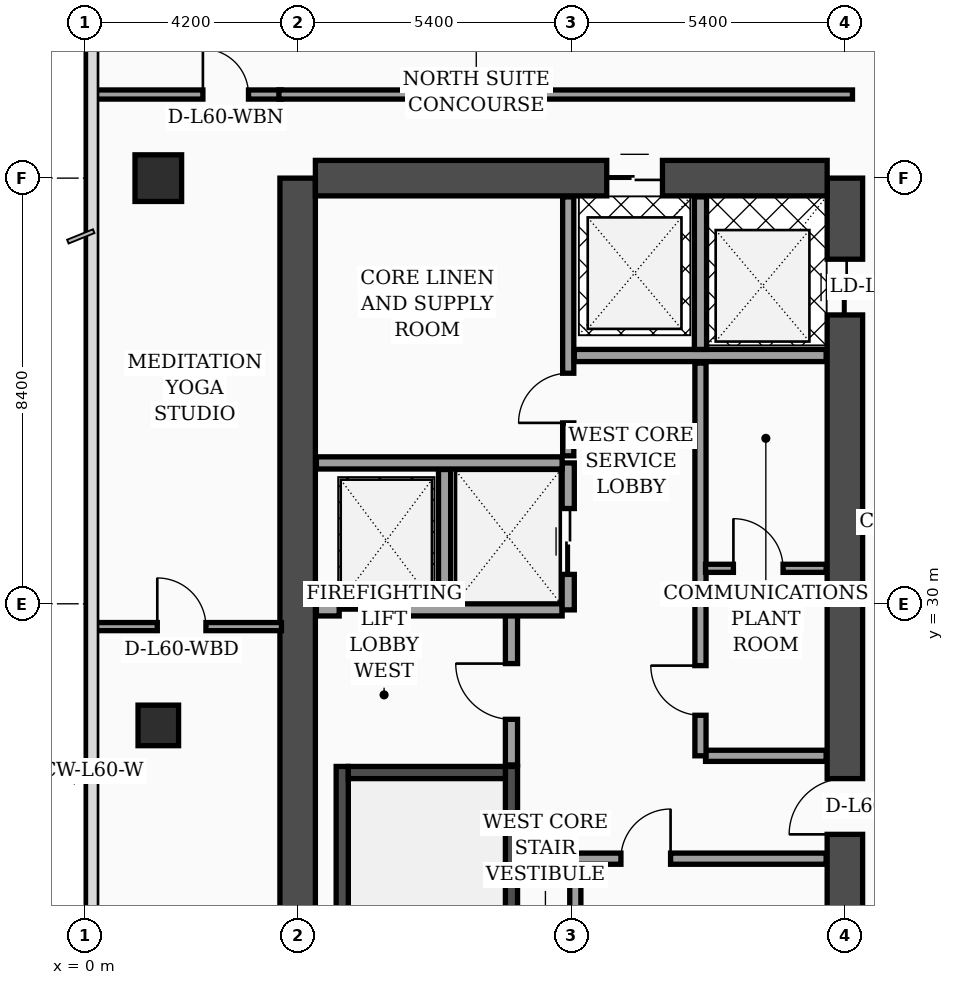
"""IFC4 building model, lengths in metres.
Left out: names, types, materials, properties, quantities, classifications, styles, units other than length and angle.
Written with IfcOpenShell. Run it as: python <this file> out.ifc"""

import sys

from ifc_helpers import new_model, si_unit, direction, frame, frame_2d, origin, origin_2d, place, context, subcontext, project, spatial, rectangle, extrude, element, fill, save


model = new_model("IFC4")
c1 = context("Model", 3, precision=1e-05, world=origin(), true_north=direction((0.0, 1.0)))
c2 = subcontext(c1, "Body", "Model", "MODEL_VIEW")
j1 = project(units=[si_unit("LENGTHUNIT", "METRE"), si_unit("PLANEANGLEUNIT", "RADIAN")], contexts=[c1])
p1 = place(None, origin())
s1 = spatial("IfcSite", under=j1, at=p1, CompositionType="ELEMENT")
p2 = place(p1, origin())
s2 = spatial("IfcBuilding", under=s1, at=p2, CompositionType="ELEMENT")
p3 = place(p2, frame((0.0, 0.0, 243.8)))
s3 = spatial("IfcBuildingStorey", under=s2, at=p3, CompositionType="ELEMENT", Elevation=243.8)
p4 = place(p3, frame((4.2, 16.8, 0.0), z_axis=(0.0, 0.0, 1.0), x_axis=(0.0, 1.0, 0.0)))
e1 = element("IfcWall", 1, at=p4, inside=s3, PredefinedType="SHEAR", context=c2, shape_type="SweptSolid", body=[
    extrude(rectangle(XDim=21.6, YDim=0.7, at=frame_2d((10.8, 0.0))), origin(), (0.0, 0.0, 1.0), 3.56),
])
p5 = place(p3, frame((15.0, 16.8, 0.0), z_axis=(0.0, 0.0, 1.0), x_axis=(0.0, 1.0, 0.0)))
e2 = element("IfcWall", 2, at=p5, inside=s3, PredefinedType="SHEAR", context=c2, shape_type="SweptSolid", body=[
    extrude(rectangle(XDim=21.6, YDim=0.7, at=frame_2d((10.8, 0.0))), origin(), (0.0, 0.0, 1.0), 3.56),
])
p6 = place(p5, frame((8.65, 0.0, 0.0)))
e3 = element("IfcOpeningElement", 3, at=p6, cuts=e2, PredefinedType="OPENING", context=c2, shape_type="SweptSolid", body=[
    extrude(rectangle(XDim=1.1, YDim=2.2, at=frame_2d((0.55, 1.1))), frame((0.0, 0.36, 0.0), z_axis=(0.0, -1.0, 0.0), x_axis=(1.0, 0.0, 0.0)), (0.0, 0.0, 1.0), 0.72),
])
p7 = place(p5, frame((18.9, 0.0, 0.0)))
e4 = element("IfcOpeningElement", 4, at=p7, cuts=e2, PredefinedType="OPENING", context=c2, shape_type="SweptSolid", body=[
    extrude(rectangle(XDim=1.1, YDim=2.2, at=frame_2d((0.55, 1.1))), frame((0.0, 0.36, 0.0), z_axis=(0.0, -1.0, 0.0), x_axis=(1.0, 0.0, 0.0)), (0.0, 0.0, 1.0), 0.72),
])
p8 = place(p3, frame((4.55, 38.4, 0.0), z_axis=(0.0, 0.0, 1.0), x_axis=(1.0, 0.0, 0.0)))
e5 = element("IfcWall", 5, at=p8, inside=s3, PredefinedType="SHEAR", context=c2, shape_type="SweptSolid", body=[
    extrude(rectangle(XDim=10.1, YDim=0.7, at=frame_2d((5.05, 0.0))), origin(), (0.0, 0.0, 1.0), 3.56),
])
p9 = place(p8, frame((5.75, 0.0, 0.0)))
e6 = element("IfcOpeningElement", 6, at=p9, cuts=e5, PredefinedType="OPENING", context=c2, shape_type="SweptSolid", body=[
    extrude(rectangle(XDim=1.1, YDim=2.2, at=frame_2d((0.55, 1.1))), frame((0.0, 0.36, 0.0), z_axis=(0.0, -1.0, 0.0), x_axis=(1.0, 0.0, 0.0)), (0.0, 0.0, 1.0), 0.72),
])
p10 = place(p3, frame((5.08, 17.15, 0.0), z_axis=(0.0, 0.0, 1.0), x_axis=(0.0, 1.0, 0.0)))
e7 = element("IfcWall", 7, at=p10, inside=s3, PredefinedType="SOLIDWALL", context=c2, shape_type="SweptSolid", body=[
    extrude(rectangle(XDim=9.64, YDim=0.24, at=frame_2d((4.82, 0.0))), origin(), (0.0, 0.0, 1.0), 3.56),
])
p11 = place(p3, frame((8.42, 17.15, 0.0), z_axis=(0.0, 0.0, 1.0), x_axis=(0.0, 1.0, 0.0)))
e8 = element("IfcWall", 8, at=p11, inside=s3, PredefinedType="SOLIDWALL", context=c2, shape_type="SweptSolid", body=[
    extrude(rectangle(XDim=9.64, YDim=0.24, at=frame_2d((4.82, 0.0))), origin(), (0.0, 0.0, 1.0), 3.56),
])
p12 = place(p11, frame((0.35, 0.0, 0.0)))
e9 = element("IfcOpeningElement", 9, at=p12, cuts=e8, PredefinedType="OPENING", context=c2, shape_type="SweptSolid", body=[
    extrude(rectangle(XDim=1.15, YDim=2.2, at=frame_2d((0.575, 1.1))), frame((0.0, 0.13, 0.0), z_axis=(0.0, -1.0, 0.0), x_axis=(1.0, 0.0, 0.0)), (0.0, 0.0, 1.0), 0.26),
])
p13 = place(p3, frame((5.2, 26.67, 0.0), z_axis=(0.0, 0.0, 1.0), x_axis=(1.0, 0.0, 0.0)))
e10 = element("IfcWall", 10, at=p13, inside=s3, PredefinedType="SOLIDWALL", context=c2, shape_type="SweptSolid", body=[
    extrude(rectangle(XDim=3.1, YDim=0.24, at=frame_2d((1.55, 0.0))), origin(), (0.0, 0.0, 1.0), 3.56),
])
p14 = place(p3, frame((1.45, 27.6, 0.0), z_axis=(0.0, 0.0, 1.0), x_axis=(1.0, 0.0, 0.0)))
e11 = element("IfcColumn", 11, at=p14, inside=s3, PredefinedType="COLUMN", context=c2, shape_type="SweptSolid", body=[
    extrude(rectangle(XDim=0.8, YDim=0.8, at=origin_2d()), origin(), (0.0, 0.0, 1.0), 3.56),
])
p15 = place(p3, frame((1.45, 38.4, 0.0), z_axis=(0.0, 0.0, 1.0), x_axis=(1.0, 0.0, 0.0)))
e12 = element("IfcColumn", 12, at=p15, inside=s3, PredefinedType="COLUMN", context=c2, shape_type="SweptSolid", body=[
    extrude(rectangle(XDim=0.92, YDim=0.92, at=origin_2d()), origin(), (0.0, 0.0, 1.0), 3.56),
])
p16 = place(p3, frame((8.42, 26.82, 0.0), z_axis=(0.0, 0.0, 1.0), x_axis=(0.0, 1.0, 0.0)))
e13 = element("IfcWall", 13, at=p16, inside=s3, PredefinedType="SOLIDWALL", context=c2, shape_type="SweptSolid", body=[
    extrude(rectangle(XDim=3.0, YDim=0.24, at=frame_2d((1.5, 0.0))), origin(), (0.0, 0.0, 1.0), 3.56),
])
p17 = place(p16, frame((0.9, 0.0, 0.0)))
e14 = element("IfcOpeningElement", 14, at=p17, cuts=e13, PredefinedType="OPENING", context=c2, shape_type="SweptSolid", body=[
    extrude(rectangle(XDim=1.1, YDim=2.2, at=frame_2d((0.55, 1.1))), frame((0.0, 0.13, 0.0), z_axis=(0.0, -1.0, 0.0), x_axis=(1.0, 0.0, 0.0)), (0.0, 0.0, 1.0), 0.26),
])
p18 = place(p3, frame((4.57, 29.88, 0.0), z_axis=(0.0, 0.0, 1.0), x_axis=(1.0, 0.0, 0.0)))
e15 = element("IfcWall", 15, at=p18, inside=s3, PredefinedType="SOLIDWALL", context=c2, shape_type="SweptSolid", body=[
    extrude(rectangle(XDim=4.85, YDim=0.24, at=frame_2d((2.425, 0.0))), origin(), (0.0, 0.0, 1.0), 3.56),
])
p19 = place(p18, frame((0.45, 0.0, 0.0)))
e16 = element("IfcOpeningElement", 16, at=p19, cuts=e15, PredefinedType="OPENING", context=c2, shape_type="SweptSolid", body=[
    extrude(rectangle(XDim=1.3, YDim=2.35, at=frame_2d((0.65, 1.175))), frame((0.0, 0.13, 0.0), z_axis=(0.0, -1.0, 0.0), x_axis=(1.0, 0.0, 0.0)), (0.0, 0.0, 1.0), 0.26),
])
p20 = place(p3, frame((7.1, 30.02, 0.0), z_axis=(0.0, 0.0, 1.0), x_axis=(0.0, 1.0, 0.0)))
e17 = element("IfcWall", 17, at=p20, inside=s3, PredefinedType="SOLIDWALL", context=c2, shape_type="SweptSolid", body=[
    extrude(rectangle(XDim=2.63, YDim=0.24, at=frame_2d((1.315, 0.0))), origin(), (0.0, 0.0, 1.0), 3.56),
])
p21 = place(p3, frame((9.54, 29.88, 0.0), z_axis=(0.0, 0.0, 1.0), x_axis=(0.0, 1.0, 0.0)))
e18 = element("IfcWall", 18, at=p21, inside=s3, PredefinedType="SOLIDWALL", context=c2, shape_type="SweptSolid", body=[
    extrude(rectangle(XDim=2.9, YDim=0.24, at=frame_2d((1.45, 0.0))), origin(), (0.0, 0.0, 1.0), 3.56),
])
p22 = place(p21, frame((0.7, 0.0, 0.0)))
e19 = element("IfcOpeningElement", 19, at=p22, cuts=e18, PredefinedType="OPENING", context=c2, shape_type="SweptSolid", body=[
    extrude(rectangle(XDim=1.3, YDim=2.35, at=frame_2d((0.65, 1.175))), frame((0.0, 0.13, 0.0), z_axis=(0.0, -1.0, 0.0), x_axis=(1.0, 0.0, 0.0)), (0.0, 0.0, 1.0), 0.26),
])
p23 = place(p3, frame((4.57, 32.78, 0.0), z_axis=(0.0, 0.0, 1.0), x_axis=(1.0, 0.0, 0.0)))
e20 = element("IfcWall", 20, at=p23, inside=s3, PredefinedType="SOLIDWALL", context=c2, shape_type="SweptSolid", body=[
    extrude(rectangle(XDim=4.85, YDim=0.24, at=frame_2d((2.425, 0.0))), origin(), (0.0, 0.0, 1.0), 3.19),
])
p24 = place(p3, frame((9.68, 17.17, 0.0), z_axis=(0.0, 0.0, 1.0), x_axis=(0.0, 1.0, 0.0)))
e21 = element("IfcWall", 21, at=p24, inside=s3, PredefinedType="SOLIDWALL", context=c2, shape_type="SweptSolid", body=[
    extrude(rectangle(XDim=7.83, YDim=0.22, at=frame_2d((3.915, 0.0))), origin(), (0.0, 0.0, 1.0), 3.56),
])
p25 = place(p3, frame((9.54, 32.92, 0.0), z_axis=(0.0, 0.0, 1.0), x_axis=(0.0, 1.0, 0.0)))
e22 = element("IfcWall", 22, at=p25, inside=s3, PredefinedType="SOLIDWALL", context=c2, shape_type="SweptSolid", body=[
    extrude(rectangle(XDim=5.11, YDim=0.22, at=frame_2d((2.555, 0.0))), origin(), (0.0, 0.0, 1.0), 3.56),
])
p26 = place(p25, frame((0.65, 0.0, 0.0)))
e23 = element("IfcOpeningElement", 23, at=p26, cuts=e22, PredefinedType="OPENING", context=c2, shape_type="SweptSolid", body=[
    extrude(rectangle(XDim=0.98, YDim=2.15, at=frame_2d((0.49, 1.075))), frame((0.0, 0.12, 0.0), z_axis=(0.0, -1.0, 0.0), x_axis=(1.0, 0.0, 0.0)), (0.0, 0.0, 1.0), 0.24),
])
p27 = place(p3, frame((9.68, 24.97, 0.0), z_axis=(0.0, 0.0, 1.0), x_axis=(1.0, 0.0, 0.0)))
e24 = element("IfcWall", 24, at=p27, inside=s3, PredefinedType="SOLIDWALL", context=c2, shape_type="SweptSolid", body=[
    extrude(rectangle(XDim=4.95, YDim=0.22, at=frame_2d((2.475, 0.0))), origin(), (0.0, 0.0, 1.0), 2.99),
])
p28 = place(p27, frame((0.9, 0.0, 0.0)))
e25 = element("IfcOpeningElement", 25, at=p28, cuts=e24, PredefinedType="OPENING", context=c2, shape_type="SweptSolid", body=[
    extrude(rectangle(XDim=0.98, YDim=2.15, at=frame_2d((0.49, 1.075))), frame((0.0, 0.12, 0.0), z_axis=(0.0, -1.0, 0.0), x_axis=(1.0, 0.0, 0.0)), (0.0, 0.0, 1.0), 0.24),
])
p29 = place(p3, frame((12.25, 27.0, 0.0), z_axis=(0.0, 0.0, 1.0), x_axis=(1.0, 0.0, 0.0)))
e26 = element("IfcWall", 26, at=p29, inside=s3, PredefinedType="SOLIDWALL", context=c2, shape_type="SweptSolid", body=[
    extrude(rectangle(XDim=2.38, YDim=0.22, at=frame_2d((1.19, 0.0))), origin(), (0.0, 0.0, 1.0), 3.56),
])
p30 = place(p3, frame((12.15, 27.0, 0.0), z_axis=(0.0, 0.0, 1.0), x_axis=(0.0, 1.0, 0.0)))
e27 = element("IfcWall", 27, at=p30, inside=s3, PredefinedType="SOLIDWALL", context=c2, shape_type="SweptSolid", body=[
    extrude(rectangle(XDim=7.75, YDim=0.22, at=frame_2d((3.875, 0.0))), origin(), (0.0, 0.0, 1.0), 3.56),
])
p31 = place(p30, frame((0.8, 0.0, 0.0)))
e28 = element("IfcOpeningElement", 28, at=p31, cuts=e27, PredefinedType="OPENING", context=c2, shape_type="SweptSolid", body=[
    extrude(rectangle(XDim=0.98, YDim=2.15, at=frame_2d((0.49, 1.075))), frame((0.0, 0.12, 0.0), z_axis=(0.0, -1.0, 0.0), x_axis=(1.0, 0.0, 0.0)), (0.0, 0.0, 1.0), 0.24),
])
p32 = place(p3, frame((12.25, 30.7, 0.0), z_axis=(0.0, 0.0, 1.0), x_axis=(1.0, 0.0, 0.0)))
e29 = element("IfcWall", 29, at=p32, inside=s3, PredefinedType="PARTITIONING", context=c2, shape_type="SweptSolid", body=[
    extrude(rectangle(XDim=2.38, YDim=0.16, at=frame_2d((1.19, 0.0))), origin(), (0.0, 0.0, 1.0), 3.56),
])
p33 = place(p32, frame((0.55, 0.0, 0.0)))
e30 = element("IfcOpeningElement", 30, at=p33, cuts=e29, PredefinedType="OPENING", context=c2, shape_type="SweptSolid", body=[
    extrude(rectangle(XDim=0.98, YDim=2.15, at=frame_2d((0.49, 1.075))), frame((0.0, 0.09, 0.0), z_axis=(0.0, -1.0, 0.0), x_axis=(1.0, 0.0, 0.0)), (0.0, 0.0, 1.0), 0.18),
])
p34 = place(p3, frame((9.66, 34.9, 0.0), z_axis=(0.0, 0.0, 1.0), x_axis=(1.0, 0.0, 0.0)))
e31 = element("IfcWall", 31, at=p34, inside=s3, PredefinedType="SOLIDWALL", context=c2, shape_type="SweptSolid", body=[
    extrude(rectangle(XDim=4.97, YDim=0.24, at=frame_2d((2.485, 0.0))), origin(), (0.0, 0.0, 1.0), 3.56),
])
p35 = place(p3, frame((12.15, 35.02, 0.0), z_axis=(0.0, 0.0, 1.0), x_axis=(0.0, 1.0, 0.0)))
e32 = element("IfcWall", 32, at=p35, inside=s3, PredefinedType="SOLIDWALL", context=c2, shape_type="SweptSolid", body=[
    extrude(rectangle(XDim=3.01, YDim=0.24, at=frame_2d((1.505, 0.0))), origin(), (0.0, 0.0, 1.0), 3.56),
])
p36 = place(p3, frame((0.08, 29.55, 0.0), z_axis=(0.0, 0.0, 1.0), x_axis=(1.0, 0.0, 0.0)))
e33 = element("IfcWall", 33, at=p36, inside=s3, PredefinedType="PARTITIONING", context=c2, shape_type="SweptSolid", body=[
    extrude(rectangle(XDim=3.8, YDim=0.16, at=frame_2d((1.9, 0.0))), origin(), (0.0, 0.0, 1.0), 3.09),
])
p37 = place(p36, frame((1.35, 0.0, 0.0)))
e34 = element("IfcOpeningElement", 34, at=p37, cuts=e33, PredefinedType="OPENING", context=c2, shape_type="SweptSolid", body=[
    extrude(rectangle(XDim=0.96, YDim=2.2, at=frame_2d((0.48, 1.1))), frame((0.0, 0.09, 0.0), z_axis=(0.0, -1.0, 0.0), x_axis=(1.0, 0.0, 0.0)), (0.0, 0.0, 1.0), 0.18),
])
p38 = place(p3, frame((0.08, 40.05, 0.0), z_axis=(0.0, 0.0, 1.0), x_axis=(1.0, 0.0, 0.0)))
e35 = element("IfcWall", 35, at=p38, inside=s3, PredefinedType="PARTITIONING", context=c2, shape_type="SweptSolid", body=[
    extrude(rectangle(XDim=3.8, YDim=0.18, at=frame_2d((1.9, 0.0))), origin(), (0.0, 0.0, 1.0), 2.99),
])
p39 = place(p38, frame((2.25, 0.0, 0.0)))
e36 = element("IfcOpeningElement", 36, at=p39, cuts=e35, PredefinedType="OPENING", context=c2, shape_type="SweptSolid", body=[
    extrude(rectangle(XDim=0.9, YDim=2.15, at=frame_2d((0.45, 1.075))), frame((0.0, 0.1, 0.0), z_axis=(0.0, -1.0, 0.0), x_axis=(1.0, 0.0, 0.0)), (0.0, 0.0, 1.0), 0.2),
])
p40 = place(p3, frame((3.83, 40.05, 0.0), z_axis=(0.0, 0.0, 1.0), x_axis=(1.0, 0.0, 0.0)))
e37 = element("IfcWall", 37, at=p40, inside=s3, PredefinedType="PARTITIONING", context=c2, shape_type="SweptSolid", body=[
    extrude(rectangle(XDim=11.32, YDim=0.18, at=frame_2d((5.66, 0.0))), origin(), (0.0, 0.0, 1.0), 2.99),
])
p41 = place(p17, origin())
e38 = element("IfcDoor", 38, at=p41, inside=s3, OperationType="SINGLE_SWING_RIGHT", PredefinedType="DOOR", context=c2, shape_type="SweptSolid", body=[
    extrude(rectangle(XDim=1.1, YDim=2.2, at=frame_2d((0.55, 1.1))), frame((0.0, 0.025, 0.0), z_axis=(0.0, -1.0, 0.0), x_axis=(1.0, 0.0, 0.0)), (0.0, 0.0, 1.0), 0.05),
])
fill(e14, e38)
p42 = place(p19, origin())
e39 = element("IfcDoor", 39, at=p42, inside=s3, OperationType="DOUBLE_DOOR_SLIDING", PredefinedType="DOOR", context=c2, shape_type="SweptSolid", body=[
    extrude(rectangle(XDim=1.3, YDim=2.35, at=frame_2d((0.65, 1.175))), frame((0.0, 0.025, 0.0), z_axis=(0.0, -1.0, 0.0), x_axis=(1.0, 0.0, 0.0)), (0.0, 0.0, 1.0), 0.05),
])
fill(e16, e39)
p43 = place(p22, origin())
e40 = element("IfcDoor", 40, at=p43, inside=s3, OperationType="DOUBLE_DOOR_SLIDING", PredefinedType="DOOR", context=c2, shape_type="SweptSolid", body=[
    extrude(rectangle(XDim=1.3, YDim=2.35, at=frame_2d((0.65, 1.175))), frame((0.0, 0.025, 0.0), z_axis=(0.0, -1.0, 0.0), x_axis=(1.0, 0.0, 0.0)), (0.0, 0.0, 1.0), 0.05),
])
fill(e19, e40)
p44 = place(p26, origin())
e41 = element("IfcDoor", 41, at=p44, inside=s3, OperationType="SINGLE_SWING_LEFT", PredefinedType="DOOR", context=c2, shape_type="SweptSolid", body=[
    extrude(rectangle(XDim=0.98, YDim=2.15, at=frame_2d((0.49, 1.075))), frame((0.0, 0.025, 0.0), z_axis=(0.0, -1.0, 0.0), x_axis=(1.0, 0.0, 0.0)), (0.0, 0.0, 1.0), 0.05),
])
fill(e23, e41)
p45 = place(p28, origin())
e42 = element("IfcDoor", 42, at=p45, inside=s3, OperationType="SINGLE_SWING_RIGHT", PredefinedType="DOOR", context=c2, shape_type="SweptSolid", body=[
    extrude(rectangle(XDim=0.98, YDim=2.15, at=frame_2d((0.49, 1.075))), frame((0.0, 0.025, 0.0), z_axis=(0.0, -1.0, 0.0), x_axis=(1.0, 0.0, 0.0)), (0.0, 0.0, 1.0), 0.05),
])
fill(e25, e42)
p46 = place(p31, origin())
e43 = element("IfcDoor", 43, at=p46, inside=s3, OperationType="SINGLE_SWING_RIGHT", PredefinedType="DOOR", context=c2, shape_type="SweptSolid", body=[
    extrude(rectangle(XDim=0.98, YDim=2.15, at=frame_2d((0.49, 1.075))), frame((0.0, 0.025, 0.0), z_axis=(0.0, -1.0, 0.0), x_axis=(1.0, 0.0, 0.0)), (0.0, 0.0, 1.0), 0.05),
])
fill(e28, e43)
p47 = place(p33, origin())
e44 = element("IfcDoor", 44, at=p47, inside=s3, OperationType="SINGLE_SWING_LEFT", PredefinedType="DOOR", context=c2, shape_type="SweptSolid", body=[
    extrude(rectangle(XDim=0.98, YDim=2.15, at=frame_2d((0.49, 1.075))), frame((0.0, 0.025, 0.0), z_axis=(0.0, -1.0, 0.0), x_axis=(1.0, 0.0, 0.0)), (0.0, 0.0, 1.0), 0.05),
])
fill(e30, e44)
p48 = place(p37, origin())
e45 = element("IfcDoor", 45, at=p48, inside=s3, OperationType="SINGLE_SWING_LEFT", PredefinedType="DOOR", context=c2, shape_type="SweptSolid", body=[
    extrude(rectangle(XDim=0.96, YDim=2.2, at=frame_2d((0.48, 1.1))), frame((0.0, 0.025, 0.0), z_axis=(0.0, -1.0, 0.0), x_axis=(1.0, 0.0, 0.0)), (0.0, 0.0, 1.0), 0.05),
])
fill(e34, e45)
p49 = place(p39, origin())
e46 = element("IfcDoor", 46, at=p49, inside=s3, OperationType="SINGLE_SWING_LEFT", PredefinedType="DOOR", context=c2, shape_type="SweptSolid", body=[
    extrude(rectangle(XDim=0.9, YDim=2.15, at=frame_2d((0.45, 1.075))), frame((0.0, 0.025, 0.0), z_axis=(0.0, -1.0, 0.0), x_axis=(1.0, 0.0, 0.0)), (0.0, 0.0, 1.0), 0.05),
])
fill(e36, e46)
p50 = place(p6, origin())
e47 = element("IfcDoor", 47, at=p50, inside=s3, OperationType="SINGLE_SWING_LEFT", PredefinedType="DOOR", context=c2, shape_type="SweptSolid", body=[
    extrude(rectangle(XDim=1.1, YDim=2.2, at=frame_2d((0.55, 1.1))), frame((0.0, 0.025, 0.0), z_axis=(0.0, -1.0, 0.0), x_axis=(1.0, 0.0, 0.0)), (0.0, 0.0, 1.0), 0.05),
])
fill(e3, e47)
p51 = place(p7, origin())
e48 = element("IfcDoor", 48, at=p51, inside=s3, OperationType="DOUBLE_DOOR_SLIDING", PredefinedType="DOOR", context=c2, shape_type="SweptSolid", body=[
    extrude(rectangle(XDim=1.1, YDim=2.2, at=frame_2d((0.55, 1.1))), frame((0.0, 0.025, 0.0), z_axis=(0.0, -1.0, 0.0), x_axis=(1.0, 0.0, 0.0)), (0.0, 0.0, 1.0), 0.05),
])
fill(e4, e48)
p52 = place(p9, origin())
e49 = element("IfcDoor", 49, at=p52, inside=s3, OperationType="DOUBLE_DOOR_SLIDING", PredefinedType="DOOR", context=c2, shape_type="SweptSolid", body=[
    extrude(rectangle(XDim=1.1, YDim=2.2, at=frame_2d((0.55, 1.1))), frame((0.0, 0.025, 0.0), z_axis=(0.0, -1.0, 0.0), x_axis=(1.0, 0.0, 0.0)), (0.0, 0.0, 1.0), 0.05),
])
fill(e6, e49)
save(model, sys.argv[1])
